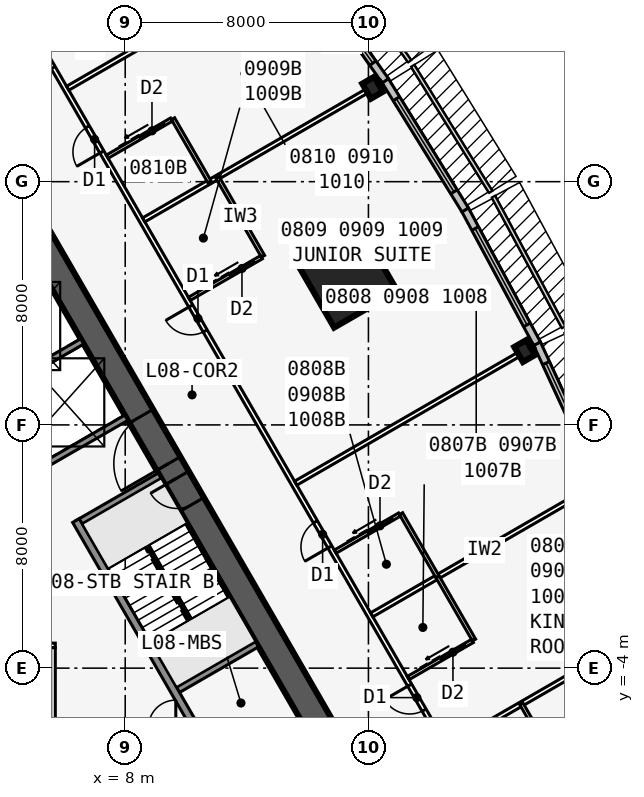
"""IFC4 building model, lengths in metres.
Left out: names, types, materials, properties, quantities, classifications, styles, units other than length and angle.
Written with IfcOpenShell. Run it as: python <this file> out.ifc"""

import sys

from ifc_helpers import new_model, si_unit, direction, frame, frame_2d, origin, origin_2d, place, context, subcontext, project, spatial, rectangle, i_section, extrude, element, fill, save


model = new_model("IFC4")
c1 = context("Model", 3, precision=1e-05, world=origin(), true_north=direction((0.0, 1.0)))
c2 = subcontext(c1, "Body", "Model", "MODEL_VIEW")
j1 = project(units=[si_unit("LENGTHUNIT", "METRE"), si_unit("PLANEANGLEUNIT", "RADIAN")], contexts=[c1])
p1 = place(None, origin())
s1 = spatial("IfcSite", under=j1, at=p1, CompositionType="ELEMENT")
p2 = place(p1, origin())
s2 = spatial("IfcBuilding", under=s1, at=p2, CompositionType="ELEMENT")
p3 = place(p2, frame((0.0, 0.0, 38.7)))
s3 = spatial("IfcBuildingStorey", under=s2, at=p3, CompositionType="ELEMENT", Elevation=38.7)
p4 = place(p3, frame((16.5, -9.526, 0.0), z_axis=(0.0, 0.0, 1.0), x_axis=(-0.499999749417, 0.866025548458, 0.0)))
e1 = element("IfcWall", 1, at=p4, inside=s3, PredefinedType="SHEAR", context=c2, shape_type="SweptSolid", body=[
    extrude(rectangle(XDim=33.0, YDim=0.9, at=frame_2d((16.5, 0.0))), origin(), (0.0, 0.0, 1.0), 3.4),
])
p5 = place(p4, frame((14.15, 0.0, 0.0)))
e2 = element("IfcOpeningElement", 2, at=p5, cuts=e1, PredefinedType="OPENING", context=c2, shape_type="SweptSolid", body=[
    extrude(rectangle(XDim=1.8, YDim=2.13, at=frame_2d((0.9, 1.065))), frame((0.0, 0.46, 0.0), z_axis=(0.0, -1.0, 0.0), x_axis=(1.0, 0.0, 0.0)), (0.0, 0.0, 1.0), 0.92),
])
p6 = place(p4, frame((12.6, 0.0, 0.0)))
e3 = element("IfcOpeningElement", 3, at=p6, cuts=e1, PredefinedType="OPENING", context=c2, shape_type="SweptSolid", body=[
    extrude(rectangle(XDim=1.0, YDim=2.13, at=frame_2d((0.5, 1.065))), frame((0.0, 0.46, 0.0), z_axis=(0.0, -1.0, 0.0), x_axis=(1.0, 0.0, 0.0)), (0.0, 0.0, 1.0), 0.92),
])
p7 = place(p3, frame((10.245, -5.843, 0.0), z_axis=(0.0, 0.0, 1.0), x_axis=(-0.499993009313, 0.866029439822, 0.0)))
e4 = element("IfcWall", 4, at=p7, inside=s3, PredefinedType="SOLIDWALL", context=c2, shape_type="SweptSolid", body=[
    extrude(rectangle(XDim=7.733, YDim=0.25, at=frame_2d((3.866, 0.0))), origin(), (0.0, 0.0, 1.0), 3.235),
])
for number, where, z_axis, x_axis in (
    (5, (9.629, -4.775, 0.0), (0.0, 0.0, 1.0), (0.866, 0.5, 0.0)),
    (6, (6.429, 0.767, 0.0), (0.0, 0.0, 1.0), (0.866, 0.5, 0.0)),
    (7, (5.329, 2.673, 0.0), (0.0, 0.0, 1.0), (0.866, 0.5, 0.0)),
    (8, (3.879, 5.184, 0.0), (0.0, 0.0, 1.0), (0.866, 0.5, 0.0)),
):
    element("IfcWall", number, at=place(p3, frame(where, z_axis=z_axis, x_axis=x_axis)), inside=s3, PredefinedType="SOLIDWALL", context=c2, shape_type="SweptSolid", body=[
        extrude(rectangle(XDim=3.125, YDim=0.2, at=frame_2d((1.562, 0.0))), origin(), (0.0, 0.0, 1.0), 3.235),
    ])
for number, where, z_axis, x_axis in (
    (9, (21.137, 6.43, 0.0), (0.0, 0.0, 1.0), (0.866, 0.5, 0.0)),
    (10, (16.137, 15.09, 0.0), (0.0, 0.0, 1.0), (0.866, 0.5, 0.0)),
):
    element("IfcColumn", number, at=place(p3, frame(where, z_axis=z_axis, x_axis=x_axis)), inside=s3, PredefinedType="COLUMN", context=c2, shape_type="SweptSolid", body=[
        extrude(i_section(OverallWidth=0.455, OverallDepth=0.569, WebThickness=0.078, FlangeThickness=0.125, at=origin_2d()), origin(), (0.0, 0.0, 1.0), 3.4),
    ])
p8 = place(p3, frame((15.312, 8.84, 0.0), z_axis=(0.0, 0.0, 1.0), x_axis=(0.866025403784, 0.5, 0.0)))
e11 = element("IfcColumn", 11, at=p8, inside=s3, PredefinedType="COLUMN", context=c2, shape_type="SweptSolid", body=[
    extrude(rectangle(XDim=2.4, YDim=2.4, at=origin_2d()), origin(), (0.0, 0.0, 1.0), 3.4),
])
p9 = place(p3, frame((23.648, 2.119, 0.0), z_axis=(0.0, 0.0, 1.0), x_axis=(-0.419203100754, 0.907892482796, 0.0)))
e12 = element("IfcWall", 12, at=p9, inside=s3, PredefinedType="STANDARD", context=c2, shape_type="SweptSolid", body=[
    extrude(rectangle(XDim=5.021, YDim=0.25, at=frame_2d((2.51, 0.0))), origin(), (0.0, 0.0, 1.0), 3.235),
])
p10 = place(p9, frame((0.71, 0.0, 0.45)))
e13 = element("IfcOpeningElement", 13, at=p10, cuts=e12, PredefinedType="OPENING", context=c2, shape_type="SweptSolid", body=[
    extrude(rectangle(XDim=3.6, YDim=2.4, at=frame_2d((1.8, 1.2))), frame((0.0, 0.135, 0.0), z_axis=(0.0, -1.0, 0.0), x_axis=(1.0, 0.0, 0.0)), (0.0, 0.0, 1.0), 0.27),
])
p11 = place(p3, frame((21.547, 6.671, 0.0), z_axis=(0.0, 0.0, 1.0), x_axis=(-0.473412820489, 0.880840678782, 0.0)))
e14 = element("IfcWall", 14, at=p11, inside=s3, PredefinedType="STANDARD", context=c2, shape_type="SweptSolid", body=[
    extrude(rectangle(XDim=5.002, YDim=0.25, at=frame_2d((2.501, 0.0))), origin(), (0.0, 0.0, 1.0), 3.235),
])
p12 = place(p11, frame((0.701, 0.0, 0.45)))
e15 = element("IfcOpeningElement", 15, at=p12, cuts=e14, PredefinedType="OPENING", context=c2, shape_type="SweptSolid", body=[
    extrude(rectangle(XDim=3.6, YDim=2.4, at=frame_2d((1.8, 1.2))), frame((0.0, 0.135, 0.0), z_axis=(0.0, -1.0, 0.0), x_axis=(1.0, 0.0, 0.0)), (0.0, 0.0, 1.0), 0.27),
])
p13 = place(p3, frame((19.182, 11.071, 0.0), z_axis=(0.0, 0.0, 1.0), x_axis=(-0.526132807704, 0.850402415717, 0.0)))
e16 = element("IfcWall", 16, at=p13, inside=s3, PredefinedType="STANDARD", context=c2, shape_type="SweptSolid", body=[
    extrude(rectangle(XDim=5.002, YDim=0.25, at=frame_2d((2.501, 0.0))), origin(), (0.0, 0.0, 1.0), 3.235),
])
p14 = place(p13, frame((0.701, 0.0, 0.45)))
e17 = element("IfcOpeningElement", 17, at=p14, cuts=e16, PredefinedType="OPENING", context=c2, shape_type="SweptSolid", body=[
    extrude(rectangle(XDim=3.6, YDim=2.4, at=frame_2d((1.8, 1.2))), frame((0.0, 0.135, 0.0), z_axis=(0.0, -1.0, 0.0), x_axis=(1.0, 0.0, 0.0)), (0.0, 0.0, 1.0), 0.27),
])
p15 = place(p3, frame((16.555, 15.318, 0.0), z_axis=(0.0, 0.0, 1.0), x_axis=(-0.5766431066, 0.81699616132, 0.0)))
e18 = element("IfcWall", 18, at=p15, inside=s3, PredefinedType="STANDARD", context=c2, shape_type="SweptSolid", body=[
    extrude(rectangle(XDim=5.021, YDim=0.25, at=frame_2d((2.51, 0.0))), origin(), (0.0, 0.0, 1.0), 3.235),
])
p16 = place(p15, frame((0.71, 0.0, 0.45)))
e19 = element("IfcOpeningElement", 19, at=p16, cuts=e18, PredefinedType="OPENING", context=c2, shape_type="SweptSolid", body=[
    extrude(rectangle(XDim=3.6, YDim=2.4, at=frame_2d((1.8, 1.2))), frame((0.0, 0.135, 0.0), z_axis=(0.0, -1.0, 0.0), x_axis=(1.0, 0.0, 0.0)), (0.0, 0.0, 1.0), 0.27),
])
p17 = place(p3, frame((21.586, -11.885, 0.0), z_axis=(0.0, 0.0, 1.0), x_axis=(-0.500001915564, 0.86602429783, 0.0)))
e20 = element("IfcWall", 20, at=p17, inside=s3, PredefinedType="PARTITIONING", context=c2, shape_type="SweptSolid", body=[
    extrude(rectangle(XDim=42.172, YDim=0.15, at=frame_2d((21.086, 0.0))), origin(), (0.0, 0.0, 1.0), 3.235),
])
p18 = place(p17, frame((1.911, 0.0, 0.0)))
e21 = element("IfcOpeningElement", 21, at=p18, cuts=e20, PredefinedType="OPENING", context=c2, shape_type="SweptSolid", body=[
    extrude(rectangle(XDim=0.95, YDim=2.13, at=frame_2d((0.475, 1.065))), frame((0.0, 0.085, 0.0), z_axis=(0.0, -1.0, 0.0), x_axis=(1.0, 0.0, 0.0)), (0.0, 0.0, 1.0), 0.17),
])
p19 = place(p17, frame((7.511, 0.0, 0.0)))
e22 = element("IfcOpeningElement", 22, at=p19, cuts=e20, PredefinedType="OPENING", context=c2, shape_type="SweptSolid", body=[
    extrude(rectangle(XDim=0.95, YDim=2.13, at=frame_2d((0.475, 1.065))), frame((0.0, 0.085, 0.0), z_axis=(0.0, -1.0, 0.0), x_axis=(1.0, 0.0, 0.0)), (0.0, 0.0, 1.0), 0.17),
])
p20 = place(p17, frame((13.711, 0.0, 0.0)))
e23 = element("IfcOpeningElement", 23, at=p20, cuts=e20, PredefinedType="OPENING", context=c2, shape_type="SweptSolid", body=[
    extrude(rectangle(XDim=0.95, YDim=2.13, at=frame_2d((0.475, 1.065))), frame((0.0, 0.085, 0.0), z_axis=(0.0, -1.0, 0.0), x_axis=(1.0, 0.0, 0.0)), (0.0, 0.0, 1.0), 0.17),
])
p21 = place(p17, frame((21.911, 0.0, 0.0)))
e24 = element("IfcOpeningElement", 24, at=p21, cuts=e20, PredefinedType="OPENING", context=c2, shape_type="SweptSolid", body=[
    extrude(rectangle(XDim=0.95, YDim=2.13, at=frame_2d((0.475, 1.065))), frame((0.0, 0.085, 0.0), z_axis=(0.0, -1.0, 0.0), x_axis=(1.0, 0.0, 0.0)), (0.0, 0.0, 1.0), 0.17),
])
p22 = place(p17, frame((28.711, 0.0, 0.0)))
e25 = element("IfcOpeningElement", 25, at=p22, cuts=e20, PredefinedType="OPENING", context=c2, shape_type="SweptSolid", body=[
    extrude(rectangle(XDim=0.95, YDim=2.13, at=frame_2d((0.475, 1.065))), frame((0.0, 0.085, 0.0), z_axis=(0.0, -1.0, 0.0), x_axis=(1.0, 0.0, 0.0)), (0.0, 0.0, 1.0), 0.17),
])
p23 = place(p17, frame((31.911, 0.0, 0.0)))
e26 = element("IfcOpeningElement", 26, at=p23, cuts=e20, PredefinedType="OPENING", context=c2, shape_type="SweptSolid", body=[
    extrude(rectangle(XDim=0.95, YDim=2.13, at=frame_2d((0.475, 1.065))), frame((0.0, 0.085, 0.0), z_axis=(0.0, -1.0, 0.0), x_axis=(1.0, 0.0, 0.0)), (0.0, 0.0, 1.0), 0.17),
])
p24 = place(p17, frame((39.311, 0.0, 0.0)))
e27 = element("IfcOpeningElement", 27, at=p24, cuts=e20, PredefinedType="OPENING", context=c2, shape_type="SweptSolid", body=[
    extrude(rectangle(XDim=0.95, YDim=2.13, at=frame_2d((0.475, 1.065))), frame((0.0, 0.085, 0.0), z_axis=(0.0, -1.0, 0.0), x_axis=(1.0, 0.0, 0.0)), (0.0, 0.0, 1.0), 0.17),
])
p25 = place(p3, frame((18.608, -6.577, 0.0), z_axis=(0.0, 0.0, 1.0), x_axis=(0.866034818847, 0.499983692279, 0.0)))
e28 = element("IfcWall", 28, at=p25, inside=s3, PredefinedType="PARTITIONING", context=c2, shape_type="SweptSolid", body=[
    extrude(rectangle(XDim=7.82, YDim=0.15, at=frame_2d((3.91, 0.0))), origin(), (0.0, 0.0, 1.0), 2.389),
])
p26 = place(p3, frame((16.108, -2.247, 0.0), z_axis=(0.0, 0.0, 1.0), x_axis=(0.866018881988, 0.500011295912, 0.0)))
e29 = element("IfcWall", 29, at=p26, inside=s3, PredefinedType="PARTITIONING", context=c2, shape_type="SweptSolid", body=[
    extrude(rectangle(XDim=8.585, YDim=0.15, at=frame_2d((4.292, 0.0))), origin(), (0.0, 0.0, 1.0), 2.389),
])
for number, where, z_axis, x_axis in (
    (30, (13.608, 2.083, 0.0), (0.0, 0.0, 1.0), (0.866, 0.5, 0.0)),
    (31, (8.608, 10.743, 0.0), (0.0, 0.0, 1.0), (0.866, 0.5, 0.0)),
):
    element("IfcWall", number, at=place(p3, frame(where, z_axis=z_axis, x_axis=x_axis)), inside=s3, PredefinedType="PARTITIONING", context=c2, shape_type="SweptSolid", body=[
        extrude(rectangle(XDim=9.043, YDim=0.15, at=frame_2d((4.521, 0.0))), origin(), (0.0, 0.0, 1.0), 2.389),
    ])
p27 = place(p3, frame((6.108, 15.073, 0.0), z_axis=(0.0, 0.0, 1.0), x_axis=(0.866031196456, 0.499989966665, 0.0)))
e32 = element("IfcWall", 32, at=p27, inside=s3, PredefinedType="PARTITIONING", context=c2, shape_type="SweptSolid", body=[
    extrude(rectangle(XDim=8.585, YDim=0.15, at=frame_2d((4.292, 0.0))), origin(), (0.0, 0.0, 1.0), 2.389),
])
p28 = place(p3, frame((22.533, -7.775, 0.0), z_axis=(0.0, 0.0, 1.0), x_axis=(-0.499990139034, 0.866031096941, 0.0)))
e33 = element("IfcWall", 33, at=p28, inside=s3, PredefinedType="PLUMBINGWALL", context=c2, shape_type="SweptSolid", body=[
    extrude(rectangle(XDim=3.0, YDim=0.12, at=frame_2d((1.5, 0.0))), origin(), (0.0, 0.0, 1.0), 3.235),
])
p29 = place(p3, frame((19.473, -3.076, 0.0), z_axis=(0.0, 0.0, 1.0), x_axis=(-0.499957262057, 0.866050077142, 0.0)))
e34 = element("IfcWall", 34, at=p29, inside=s3, PredefinedType="PLUMBINGWALL", context=c2, shape_type="SweptSolid", body=[
    extrude(rectangle(XDim=2.4, YDim=0.12, at=frame_2d((1.2, 0.0))), origin(), (0.0, 0.0, 1.0), 3.235),
])
p30 = place(p3, frame((17.308, -4.326, 0.0), z_axis=(0.0, 0.0, 1.0), x_axis=(0.866023955769, 0.500002508028, 0.0)))
e35 = element("IfcWall", 35, at=p30, inside=s3, PredefinedType="PLUMBINGWALL", context=c2, shape_type="SweptSolid", body=[
    extrude(rectangle(XDim=2.44, YDim=0.12, at=frame_2d((1.22, 0.0))), origin(), (0.0, 0.0, 1.0), 3.235),
])
p31 = place(p30, frame((1.25, 0.0, 0.0)))
e36 = element("IfcOpeningElement", 36, at=p31, cuts=e35, PredefinedType="OPENING", context=c2, shape_type="SweptSolid", body=[
    extrude(rectangle(XDim=0.9, YDim=2.13, at=frame_2d((0.45, 1.065))), frame((0.0, 0.07, 0.0), z_axis=(0.0, -1.0, 0.0), x_axis=(1.0, 0.0, 0.0)), (0.0, 0.0, 1.0), 0.14),
])
p32 = place(p3, frame((18.273, -0.997, 0.0), z_axis=(0.0, 0.0, 1.0), x_axis=(-0.500001309137, 0.866024647952, 0.0)))
e37 = element("IfcWall", 37, at=p32, inside=s3, PredefinedType="PLUMBINGWALL", context=c2, shape_type="SweptSolid", body=[
    extrude(rectangle(XDim=2.4, YDim=0.12, at=frame_2d((1.2, 0.0))), origin(), (0.0, 0.0, 1.0), 3.235),
])
p33 = place(p3, frame((14.908, -0.169, 0.0), z_axis=(0.0, 0.0, 1.0), x_axis=(0.866023955769, 0.500002508028, 0.0)))
e38 = element("IfcWall", 38, at=p33, inside=s3, PredefinedType="PLUMBINGWALL", context=c2, shape_type="SweptSolid", body=[
    extrude(rectangle(XDim=2.44, YDim=0.12, at=frame_2d((1.22, 0.0))), origin(), (0.0, 0.0, 1.0), 3.235),
])
p34 = place(p33, frame((1.25, 0.0, 0.0)))
e39 = element("IfcOpeningElement", 39, at=p34, cuts=e38, PredefinedType="OPENING", context=c2, shape_type="SweptSolid", body=[
    extrude(rectangle(XDim=0.9, YDim=2.13, at=frame_2d((0.45, 1.065))), frame((0.0, 0.07, 0.0), z_axis=(0.0, -1.0, 0.0), x_axis=(1.0, 0.0, 0.0)), (0.0, 0.0, 1.0), 0.14),
])
p35 = place(p3, frame((12.533, 9.545, 0.0), z_axis=(0.0, 0.0, 1.0), x_axis=(-0.499990139034, 0.866031096941, 0.0)))
e40 = element("IfcWall", 40, at=p35, inside=s3, PredefinedType="PLUMBINGWALL", context=c2, shape_type="SweptSolid", body=[
    extrude(rectangle(XDim=3.0, YDim=0.12, at=frame_2d((1.5, 0.0))), origin(), (0.0, 0.0, 1.0), 3.235),
])
p36 = place(p3, frame((10.108, 8.145, 0.0), z_axis=(0.0, 0.0, 1.0), x_axis=(0.866035715982, 0.499982138324, 0.0)))
e41 = element("IfcWall", 41, at=p36, inside=s3, PredefinedType="PLUMBINGWALL", context=c2, shape_type="SweptSolid", body=[
    extrude(rectangle(XDim=2.74, YDim=0.12, at=frame_2d((1.37, 0.0))), origin(), (0.0, 0.0, 1.0), 3.235),
])
p37 = place(p36, frame((1.55, 0.0, 0.0)))
e42 = element("IfcOpeningElement", 42, at=p37, cuts=e41, PredefinedType="OPENING", context=c2, shape_type="SweptSolid", body=[
    extrude(rectangle(XDim=0.9, YDim=2.13, at=frame_2d((0.45, 1.065))), frame((0.0, 0.07, 0.0), z_axis=(0.0, -1.0, 0.0), x_axis=(1.0, 0.0, 0.0)), (0.0, 0.0, 1.0), 0.14),
])
p38 = place(p3, frame((10.773, 11.993, 0.0), z_axis=(0.0, 0.0, 1.0), x_axis=(-0.500001309137, 0.866024647952, 0.0)))
e43 = element("IfcWall", 43, at=p38, inside=s3, PredefinedType="PLUMBINGWALL", context=c2, shape_type="SweptSolid", body=[
    extrude(rectangle(XDim=2.4, YDim=0.12, at=frame_2d((1.2, 0.0))), origin(), (0.0, 0.0, 1.0), 3.235),
])
p39 = place(p3, frame((7.408, 12.822, 0.0), z_axis=(0.0, 0.0, 1.0), x_axis=(0.866023955769, 0.500002508028, 0.0)))
e44 = element("IfcWall", 44, at=p39, inside=s3, PredefinedType="PLUMBINGWALL", context=c2, shape_type="SweptSolid", body=[
    extrude(rectangle(XDim=2.44, YDim=0.12, at=frame_2d((1.22, 0.0))), origin(), (0.0, 0.0, 1.0), 3.235),
])
p40 = place(p39, frame((1.25, 0.0, 0.0)))
e45 = element("IfcOpeningElement", 45, at=p40, cuts=e44, PredefinedType="OPENING", context=c2, shape_type="SweptSolid", body=[
    extrude(rectangle(XDim=0.9, YDim=2.13, at=frame_2d((0.45, 1.065))), frame((0.0, 0.07, 0.0), z_axis=(0.0, -1.0, 0.0), x_axis=(1.0, 0.0, 0.0)), (0.0, 0.0, 1.0), 0.14),
])
p41 = place(p3, frame((-2.65, -3.251, 0.0), z_axis=(0.0, 0.0, 1.0), x_axis=(1.0, 0.0, 0.0)))
e46 = element("IfcWall", 46, at=p41, inside=s3, PredefinedType="PARTITIONING", context=c2, shape_type="SweptSolid", body=[
    extrude(rectangle(XDim=8.35, YDim=0.15, at=frame_2d((4.175, 0.0))), origin(), (0.0, 0.0, 1.0), 3.235),
])
p42 = place(p3, frame((5.625, -5.826, 0.0), z_axis=(0.0, 0.0, 1.0), x_axis=(0.0, 1.0, 0.0)))
e47 = element("IfcWall", 47, at=p42, inside=s3, PredefinedType="PARTITIONING", context=c2, shape_type="SweptSolid", body=[
    extrude(rectangle(XDim=2.5, YDim=0.15, at=frame_2d((1.25, 0.0))), origin(), (0.0, 0.0, 1.0), 3.235),
])
p43 = place(p3, frame((10.135, -2.401, 0.0), z_axis=(0.0, 0.0, 1.0), x_axis=(-0.499992232847, 0.866029888106, 0.0)))
e48 = element("IfcWall", 48, at=p43, inside=s3, PredefinedType="SOLIDWALL", context=c2, shape_type="SweptSolid", body=[
    extrude(rectangle(XDim=2.794, YDim=0.1, at=frame_2d((1.397, 0.0))), origin(), (0.0, 0.0, 1.0), 3.4),
])
p44 = place(p10, origin())
e49 = element("IfcWindow", 49, at=p44, inside=s3, PartitioningType="SINGLE_PANEL", PredefinedType="WINDOW", context=c2, shape_type="SweptSolid", body=[
    extrude(rectangle(XDim=3.6, YDim=2.4, at=frame_2d((1.8, 1.2))), frame((0.0, 0.03, 0.0), z_axis=(0.0, -1.0, 0.0), x_axis=(1.0, 0.0, 0.0)), (0.0, 0.0, 1.0), 0.06),
])
fill(e13, e49)
p45 = place(p12, origin())
e50 = element("IfcWindow", 50, at=p45, inside=s3, PartitioningType="SINGLE_PANEL", PredefinedType="WINDOW", context=c2, shape_type="SweptSolid", body=[
    extrude(rectangle(XDim=3.6, YDim=2.4, at=frame_2d((1.8, 1.2))), frame((0.0, 0.03, 0.0), z_axis=(0.0, -1.0, 0.0), x_axis=(1.0, 0.0, 0.0)), (0.0, 0.0, 1.0), 0.06),
])
fill(e15, e50)
p46 = place(p14, origin())
e51 = element("IfcWindow", 51, at=p46, inside=s3, PartitioningType="SINGLE_PANEL", PredefinedType="WINDOW", context=c2, shape_type="SweptSolid", body=[
    extrude(rectangle(XDim=3.6, YDim=2.4, at=frame_2d((1.8, 1.2))), frame((0.0, 0.03, 0.0), z_axis=(0.0, -1.0, 0.0), x_axis=(1.0, 0.0, 0.0)), (0.0, 0.0, 1.0), 0.06),
])
fill(e17, e51)
p47 = place(p16, origin())
e52 = element("IfcWindow", 52, at=p47, inside=s3, PartitioningType="SINGLE_PANEL", PredefinedType="WINDOW", context=c2, shape_type="SweptSolid", body=[
    extrude(rectangle(XDim=3.6, YDim=2.4, at=frame_2d((1.8, 1.2))), frame((0.0, 0.03, 0.0), z_axis=(0.0, -1.0, 0.0), x_axis=(1.0, 0.0, 0.0)), (0.0, 0.0, 1.0), 0.06),
])
fill(e19, e52)
p48 = place(p31, origin())
e53 = element("IfcDoor", 53, at=p48, inside=s3, OperationType="SLIDING_TO_LEFT", PredefinedType="DOOR", context=c2, shape_type="SweptSolid", body=[
    extrude(rectangle(XDim=0.9, YDim=2.13, at=frame_2d((0.45, 1.065))), frame((0.0, 0.025, 0.0), z_axis=(0.0, -1.0, 0.0), x_axis=(1.0, 0.0, 0.0)), (0.0, 0.0, 1.0), 0.05),
])
fill(e36, e53)
p49 = place(p19, origin())
e54 = element("IfcDoor", 54, at=p49, inside=s3, OperationType="SINGLE_SWING_RIGHT", PredefinedType="DOOR", context=c2, shape_type="SweptSolid", body=[
    extrude(rectangle(XDim=0.95, YDim=2.13, at=frame_2d((0.475, 1.065))), frame((0.0, 0.025, 0.0), z_axis=(0.0, -1.0, 0.0), x_axis=(1.0, 0.0, 0.0)), (0.0, 0.0, 1.0), 0.05),
])
fill(e22, e54)
p50 = place(p34, origin())
e55 = element("IfcDoor", 55, at=p50, inside=s3, OperationType="SLIDING_TO_LEFT", PredefinedType="DOOR", context=c2, shape_type="SweptSolid", body=[
    extrude(rectangle(XDim=0.9, YDim=2.13, at=frame_2d((0.45, 1.065))), frame((0.0, 0.025, 0.0), z_axis=(0.0, -1.0, 0.0), x_axis=(1.0, 0.0, 0.0)), (0.0, 0.0, 1.0), 0.05),
])
fill(e39, e55)
p51 = place(p20, origin())
e56 = element("IfcDoor", 56, at=p51, inside=s3, OperationType="SINGLE_SWING_LEFT", PredefinedType="DOOR", context=c2, shape_type="SweptSolid", body=[
    extrude(rectangle(XDim=0.95, YDim=2.13, at=frame_2d((0.475, 1.065))), frame((0.0, 0.025, 0.0), z_axis=(0.0, -1.0, 0.0), x_axis=(1.0, 0.0, 0.0)), (0.0, 0.0, 1.0), 0.05),
])
fill(e23, e56)
p52 = place(p37, origin())
e57 = element("IfcDoor", 57, at=p52, inside=s3, OperationType="SLIDING_TO_LEFT", PredefinedType="DOOR", context=c2, shape_type="SweptSolid", body=[
    extrude(rectangle(XDim=0.9, YDim=2.13, at=frame_2d((0.45, 1.065))), frame((0.0, 0.025, 0.0), z_axis=(0.0, -1.0, 0.0), x_axis=(1.0, 0.0, 0.0)), (0.0, 0.0, 1.0), 0.05),
])
fill(e42, e57)
p53 = place(p21, origin())
e58 = element("IfcDoor", 58, at=p53, inside=s3, OperationType="SINGLE_SWING_RIGHT", PredefinedType="DOOR", context=c2, shape_type="SweptSolid", body=[
    extrude(rectangle(XDim=0.95, YDim=2.13, at=frame_2d((0.475, 1.065))), frame((0.0, 0.025, 0.0), z_axis=(0.0, -1.0, 0.0), x_axis=(1.0, 0.0, 0.0)), (0.0, 0.0, 1.0), 0.05),
])
fill(e24, e58)
p54 = place(p40, origin())
e59 = element("IfcDoor", 59, at=p54, inside=s3, OperationType="SLIDING_TO_LEFT", PredefinedType="DOOR", context=c2, shape_type="SweptSolid", body=[
    extrude(rectangle(XDim=0.9, YDim=2.13, at=frame_2d((0.45, 1.065))), frame((0.0, 0.025, 0.0), z_axis=(0.0, -1.0, 0.0), x_axis=(1.0, 0.0, 0.0)), (0.0, 0.0, 1.0), 0.05),
])
fill(e45, e59)
p55 = place(p22, origin())
e60 = element("IfcDoor", 60, at=p55, inside=s3, OperationType="SINGLE_SWING_LEFT", PredefinedType="DOOR", context=c2, shape_type="SweptSolid", body=[
    extrude(rectangle(XDim=0.95, YDim=2.13, at=frame_2d((0.475, 1.065))), frame((0.0, 0.025, 0.0), z_axis=(0.0, -1.0, 0.0), x_axis=(1.0, 0.0, 0.0)), (0.0, 0.0, 1.0), 0.05),
])
fill(e25, e60)
p56 = place(p23, origin())
e61 = element("IfcDoor", 61, at=p56, inside=s3, OperationType="SINGLE_SWING_RIGHT", PredefinedType="DOOR", context=c2, shape_type="SweptSolid", body=[
    extrude(rectangle(XDim=0.95, YDim=2.13, at=frame_2d((0.475, 1.065))), frame((0.0, 0.025, 0.0), z_axis=(0.0, -1.0, 0.0), x_axis=(1.0, 0.0, 0.0)), (0.0, 0.0, 1.0), 0.05),
])
fill(e26, e61)
p57 = place(p5, origin())
e62 = element("IfcDoor", 62, at=p57, inside=s3, OperationType="DOUBLE_DOOR_SINGLE_SWING", PredefinedType="DOOR", context=c2, shape_type="SweptSolid", body=[
    extrude(rectangle(XDim=1.8, YDim=2.13, at=frame_2d((0.9, 1.065))), frame((0.0, 0.025, 0.0), z_axis=(0.0, -1.0, 0.0), x_axis=(1.0, 0.0, 0.0)), (0.0, 0.0, 1.0), 0.05),
])
fill(e2, e62)
p58 = place(p6, origin())
e63 = element("IfcDoor", 63, at=p58, inside=s3, OperationType="SINGLE_SWING_RIGHT", PredefinedType="DOOR", context=c2, shape_type="SweptSolid", body=[
    extrude(rectangle(XDim=1.0, YDim=2.13, at=frame_2d((0.5, 1.065))), frame((0.0, 0.025, 0.0), z_axis=(0.0, -1.0, 0.0), x_axis=(1.0, 0.0, 0.0)), (0.0, 0.0, 1.0), 0.05),
])
fill(e3, e63)
save(model, sys.argv[1])
